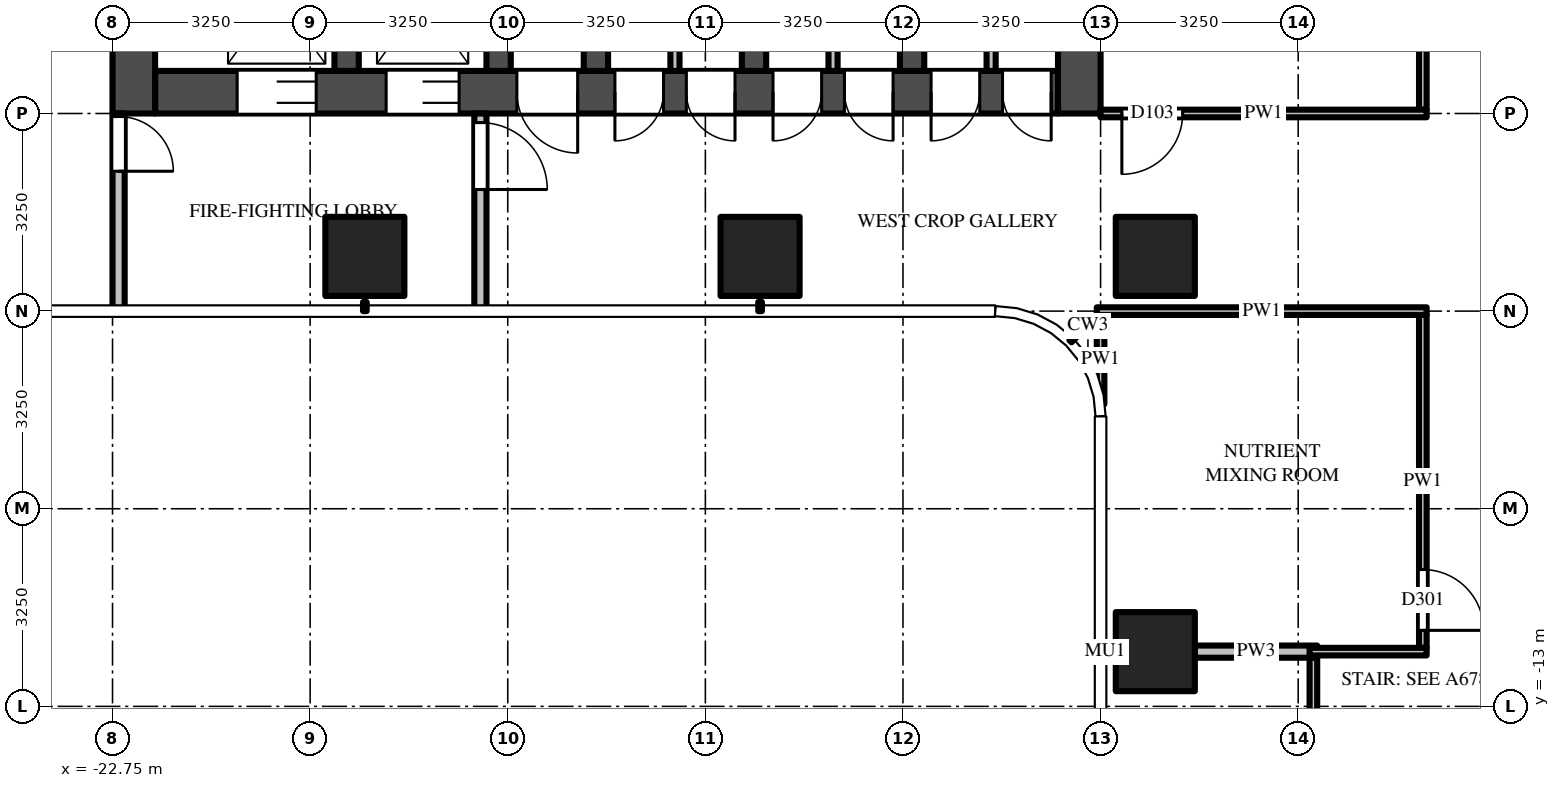
"""IFC4 building model, lengths in metres.
Left out: names, types, materials, properties, quantities, classifications, styles, units other than length and angle.
Written with IfcOpenShell. Run it as: python <this file> out.ifc"""

import sys

from ifc_helpers import new_model, si_unit, direction, frame, frame_2d, origin, origin_2d, place, context, subcontext, project, spatial, rectangle, extrude, source, transform, mapped, element, fill, save


model = new_model("IFC4")
c1 = context("Model", 3, precision=1e-05, world=origin(), true_north=direction((0.0, 1.0)))
c2 = subcontext(c1, "Body", "Model", "MODEL_VIEW")
j1 = project(units=[si_unit("LENGTHUNIT", "METRE"), si_unit("PLANEANGLEUNIT", "RADIAN")], contexts=[c1])
p1 = place(None, origin())
s1 = spatial("IfcSite", under=j1, at=p1, CompositionType="ELEMENT")
p2 = place(p1, origin())
s2 = spatial("IfcBuilding", under=s1, at=p2, CompositionType="ELEMENT")
p3 = place(p2, frame((0.0, 0.0, 120.0)))
s3 = spatial("IfcBuildingStorey", under=s2, at=p3, CompositionType="ELEMENT", Elevation=120.0)
m1 = source(origin(), c2, "Body", "SweptSolid", [
    extrude(rectangle(XDim=1.3, YDim=1.3, at=origin_2d()), origin(), (0.0, 0.0, 1.0), 4.5),
])
for number, where, z_axis, x_axis in (
    (1, (-5.6, -5.6, 0.0), (0.0, 0.0, 1.0), (1.0, 0.0, 0.0)),
    (2, (-5.6, -12.1, 0.0), (0.0, 0.0, 1.0), (1.0, 0.0, 0.0)),
    (3, (-12.1, -5.6, 0.0), (0.0, 0.0, 1.0), (1.0, 0.0, 0.0)),
    (4, (-18.6, -5.6, 0.0), (0.0, 0.0, 1.0), (1.0, 0.0, 0.0)),
):
    element("IfcColumn", number, at=place(p3, frame(where, z_axis=z_axis, x_axis=x_axis)), inside=s3, PredefinedType="COLUMN", context=c2, shape_type="MappedRepresentation", body=[
        mapped(m1, transform((0.0, 0.0, 0.0))),
    ])
m2 = source(origin(), c2, "Body", "SweptSolid", [
    extrude(rectangle(XDim=14.85, YDim=0.7, at=frame_2d((7.425, 0.0))), origin(), (0.0, 0.0, 1.0), 4.25),
])
p4 = place(p3, frame((-7.2, -2.9, 0.0), z_axis=(0.0, 0.0, 1.0), x_axis=(-1.0, 0.0, 0.0)))
e5 = element("IfcWall", 5, at=p4, inside=s3, PredefinedType="SHEAR", context=c2, shape_type="MappedRepresentation", body=[
    mapped(m2, transform((0.0, 0.0, 0.0))),
])
m3 = source(origin(), c2, "Body", "SweptSolid", [
    extrude(rectangle(XDim=1.3, YDim=2.1, at=frame_2d((0.65, 1.05))), frame((0.0, 0.36, 0.0), z_axis=(0.0, -1.0, 0.0), x_axis=(1.0, 0.0, 0.0)), (0.0, 0.0, 1.0), 0.72),
])
p5 = place(p4, frame((12.2, 0.0, 0.0)))
e6 = element("IfcOpeningElement", 6, at=p5, cuts=e5, PredefinedType="OPENING", context=c2, shape_type="MappedRepresentation", body=[
    mapped(m3, transform((0.0, 0.0, 0.0))),
])
m4 = source(origin(), c2, "Body", "SweptSolid", [
    extrude(rectangle(XDim=1.2, YDim=2.1, at=frame_2d((0.6, 1.05))), frame((0.0, 0.36, 0.0), z_axis=(0.0, -1.0, 0.0), x_axis=(1.0, 0.0, 0.0)), (0.0, 0.0, 1.0), 0.72),
])
p6 = place(p4, frame((9.85, 0.0, 0.0)))
e7 = element("IfcOpeningElement", 7, at=p6, cuts=e5, PredefinedType="OPENING", context=c2, shape_type="MappedRepresentation", body=[
    mapped(m4, transform((0.0, 0.0, 0.0))),
])
m5 = source(origin(), c2, "Body", "SweptSolid", [
    extrude(rectangle(XDim=1.0, YDim=2.1, at=frame_2d((0.5, 1.05))), frame((0.0, 0.36, 0.0), z_axis=(0.0, -1.0, 0.0), x_axis=(1.0, 0.0, 0.0)), (0.0, 0.0, 1.0), 0.72),
])
p7 = place(p4, frame((7.9, 0.0, 0.0)))
e8 = element("IfcOpeningElement", 8, at=p7, cuts=e5, PredefinedType="OPENING", context=c2, shape_type="MappedRepresentation", body=[
    mapped(m5, transform((0.0, 0.0, 0.0))),
])
m6 = source(origin(), c2, "Body", "SweptSolid", [
    extrude(rectangle(XDim=0.8, YDim=2.1, at=frame_2d((0.4, 1.05))), frame((0.0, 0.36, 0.0), z_axis=(0.0, -1.0, 0.0), x_axis=(1.0, 0.0, 0.0)), (0.0, 0.0, 1.0), 0.72),
])
p8 = place(p4, frame((0.113, 0.0, 0.0)))
e9 = element("IfcOpeningElement", 9, at=p8, cuts=e5, PredefinedType="OPENING", context=c2, shape_type="MappedRepresentation", body=[
    mapped(m6, transform((0.0, 0.0, 0.0))),
])
p9 = place(p4, frame((1.288, 0.0, 0.0)))
e10 = element("IfcOpeningElement", 10, at=p9, cuts=e5, PredefinedType="OPENING", context=c2, shape_type="MappedRepresentation", body=[
    mapped(m6, transform((0.0, 0.0, 0.0))),
])
p10 = place(p4, frame((2.712, 0.0, 0.0)))
e11 = element("IfcOpeningElement", 11, at=p10, cuts=e5, PredefinedType="OPENING", context=c2, shape_type="MappedRepresentation", body=[
    mapped(m6, transform((0.0, 0.0, 0.0))),
])
p11 = place(p4, frame((3.887, 0.0, 0.0)))
e12 = element("IfcOpeningElement", 12, at=p11, cuts=e5, PredefinedType="OPENING", context=c2, shape_type="MappedRepresentation", body=[
    mapped(m6, transform((0.0, 0.0, 0.0))),
])
p12 = place(p4, frame((5.312, 0.0, 0.0)))
e13 = element("IfcOpeningElement", 13, at=p12, cuts=e5, PredefinedType="OPENING", context=c2, shape_type="MappedRepresentation", body=[
    mapped(m6, transform((0.0, 0.0, 0.0))),
])
p13 = place(p4, frame((6.488, 0.0, 0.0)))
e14 = element("IfcOpeningElement", 14, at=p13, cuts=e5, PredefinedType="OPENING", context=c2, shape_type="MappedRepresentation", body=[
    mapped(m6, transform((0.0, 0.0, 0.0))),
])
m7 = source(origin(), c2, "Body", "SweptSolid", [
    extrude(rectangle(XDim=9.05, YDim=0.7, at=frame_2d((4.525, 0.0))), origin(), (0.0, 0.0, 1.0), 4.25),
])
p14 = place(p3, frame((-6.85, 5.8, 0.0), z_axis=(0.0, 0.0, 1.0), x_axis=(0.0, -1.0, 0.0)))
e15 = element("IfcWall", 15, at=p14, inside=s3, PredefinedType="SHEAR", context=c2, shape_type="MappedRepresentation", body=[
    mapped(m7, transform((0.0, 0.0, 0.0))),
])
m8 = source(origin(), c2, "Body", "SweptSolid", [
    extrude(rectangle(XDim=1.8, YDim=2.1, at=frame_2d((0.9, 1.05))), frame((0.0, 0.36, 0.0), z_axis=(0.0, -1.0, 0.0), x_axis=(1.0, 0.0, 0.0)), (0.0, 0.0, 1.0), 0.72),
])
p15 = place(p14, frame((3.15, 0.0, 0.0)))
e16 = element("IfcOpeningElement", 16, at=p15, cuts=e15, PredefinedType="OPENING", context=c2, shape_type="MappedRepresentation", body=[
    mapped(m8, transform((0.0, 0.0, 0.0))),
])
p16 = place(p3, frame((-22.4, 5.8, 0.0), z_axis=(0.0, 0.0, 1.0), x_axis=(0.0, -1.0, 0.0)))
e17 = element("IfcWall", 17, at=p16, inside=s3, PredefinedType="SHEAR", context=c2, shape_type="MappedRepresentation", body=[
    mapped(m7, transform((0.0, 0.0, 0.0))),
])
m9 = source(origin(), c2, "Body", "SweptSolid", [
    extrude(rectangle(XDim=2.45, YDim=0.4, at=frame_2d((1.225, 0.0))), origin(), (0.0, 0.0, 1.0), 4.25),
])
for number, where, z_axis, x_axis in (
    (18, (-9.6, -0.1, 0.0), (0.0, 0.0, 1.0), (0.0, -1.0, 0.0)),
    (19, (-12.2, -0.1, 0.0), (0.0, 0.0, 1.0), (0.0, -1.0, 0.0)),
    (20, (-14.8, -0.1, 0.0), (0.0, 0.0, 1.0), (0.0, -1.0, 0.0)),
    (21, (-16.4, -0.1, 0.0), (0.0, 0.0, 1.0), (0.0, -1.0, 0.0)),
    (22, (-18.9, -0.1, 0.0), (0.0, 0.0, 1.0), (0.0, -1.0, 0.0)),
):
    element("IfcWall", number, at=place(p3, frame(where, z_axis=z_axis, x_axis=x_axis)), inside=s3, PredefinedType="SHEAR", context=c2, shape_type="MappedRepresentation", body=[
        mapped(m9, transform((0.0, 0.0, 0.0))),
    ])
m10 = source(origin(), c2, "Body", "SweptSolid", [
    extrude(rectangle(XDim=3.25, YDim=0.2, at=frame_2d((1.625, 0.0))), origin(), (0.0, 0.0, 1.0), 4.25),
])
p17 = place(p3, frame((-16.7, -3.25, 0.0), z_axis=(0.0, 0.0, 1.0), x_axis=(0.0, -1.0, 0.0)))
e23 = element("IfcWall", 23, at=p17, inside=s3, PredefinedType="PARTITIONING", context=c2, shape_type="MappedRepresentation", body=[
    mapped(m10, transform((0.0, 0.0, 0.0))),
])
m11 = source(origin(), c2, "Body", "SweptSolid", [
    extrude(rectangle(XDim=1.1, YDim=2.1, at=frame_2d((0.55, 1.05))), frame((0.0, 0.11, 0.0), z_axis=(0.0, -1.0, 0.0), x_axis=(1.0, 0.0, 0.0)), (0.0, 0.0, 1.0), 0.22),
])
p18 = place(p17, frame((0.15, 0.0, 0.0)))
e24 = element("IfcOpeningElement", 24, at=p18, cuts=e23, PredefinedType="OPENING", context=c2, shape_type="MappedRepresentation", body=[
    mapped(m11, transform((0.0, 0.0, 0.0))),
])
p19 = place(p3, frame((-22.65, -3.25, 0.0), z_axis=(0.0, 0.0, 1.0), x_axis=(0.0, -1.0, 0.0)))
e25 = element("IfcWall", 25, at=p19, inside=s3, PredefinedType="PARTITIONING", context=c2, shape_type="MappedRepresentation", body=[
    mapped(m10, transform((0.0, 0.0, 0.0))),
])
m12 = source(origin(), c2, "Body", "SweptSolid", [
    extrude(rectangle(XDim=0.9, YDim=2.1, at=frame_2d((0.45, 1.05))), frame((0.0, 0.11, 0.0), z_axis=(0.0, -1.0, 0.0), x_axis=(1.0, 0.0, 0.0)), (0.0, 0.0, 1.0), 0.22),
])
p20 = place(p19, frame((0.05, 0.0, 0.0)))
e26 = element("IfcOpeningElement", 26, at=p20, cuts=e25, PredefinedType="OPENING", context=c2, shape_type="MappedRepresentation", body=[
    mapped(m12, transform((0.0, 0.0, 0.0))),
])
m13 = source(origin(), c2, "Body", "SweptSolid", [
    extrude(rectangle(XDim=2.45, YDim=0.15, at=frame_2d((1.225, 0.0))), origin(), (0.0, 0.0, 1.0), 4.25),
])
for number, where, z_axis, x_axis in (
    (27, (-8.3, -0.1, 0.0), (0.0, 0.0, 1.0), (0.0, -1.0, 0.0)),
    (28, (-10.9, -0.1, 0.0), (0.0, 0.0, 1.0), (0.0, -1.0, 0.0)),
    (29, (-13.5, -0.1, 0.0), (0.0, 0.0, 1.0), (0.0, -1.0, 0.0)),
):
    element("IfcWall", number, at=place(p3, frame(where, z_axis=z_axis, x_axis=x_axis)), inside=s3, PredefinedType="PARTITIONING", context=c2, shape_type="MappedRepresentation", body=[
        mapped(m13, transform((0.0, 0.0, 0.0))),
    ])
m14 = source(origin(), c2, "Body", "SweptSolid", [
    extrude(rectangle(XDim=1.469, YDim=0.125, at=frame_2d((0.734, 0.0))), origin(), (0.0, 0.0, 1.0), 4.25),
])
p21 = place(p3, frame((-6.5, -6.562, 0.0), z_axis=(0.0, 0.0, 1.0), x_axis=(0.0, -1.0, 0.0)))
e30 = element("IfcWall", 30, at=p21, inside=s3, PredefinedType="PARTITIONING", context=c2, shape_type="MappedRepresentation", body=[
    mapped(m14, transform((0.0, 0.0, 0.0))),
])
m15 = source(origin(), c2, "Body", "SweptSolid", [
    extrude(rectangle(XDim=8.738, YDim=0.125, at=frame_2d((4.369, 0.0))), origin(), (0.0, 0.0, 1.0), 3.468),
])
p22 = place(p3, frame((-3.0, -20.938, 0.0), z_axis=(0.0, 0.0, 1.0), x_axis=(0.0, 1.0, 0.0)))
e31 = element("IfcWall", 31, at=p22, inside=s3, PredefinedType="PARTITIONING", context=c2, shape_type="MappedRepresentation", body=[
    mapped(m15, transform((0.0, 0.0, 0.0))),
])
m16 = source(origin(), c2, "Body", "SweptSolid", [
    extrude(rectangle(XDim=5.475, YDim=0.125, at=frame_2d((2.738, 0.0))), origin(), (0.0, 0.0, 1.0), 3.468),
])
p23 = place(p3, frame((-1.2, -6.562, 0.0), z_axis=(0.0, 0.0, 1.0), x_axis=(0.0, -1.0, 0.0)))
e32 = element("IfcWall", 32, at=p23, inside=s3, PredefinedType="PARTITIONING", context=c2, shape_type="MappedRepresentation", body=[
    mapped(m16, transform((0.0, 0.0, 0.0))),
])
m17 = source(origin(), c2, "Body", "SweptSolid", [
    extrude(rectangle(XDim=1.0, YDim=2.1, at=frame_2d((0.5, 1.05))), frame((0.0, 0.073, 0.0), z_axis=(0.0, -1.0, 0.0), x_axis=(1.0, 0.0, 0.0)), (0.0, 0.0, 1.0), 0.145),
])
p24 = place(p23, frame((4.188, 0.0, 0.0)))
e33 = element("IfcOpeningElement", 33, at=p24, cuts=e32, PredefinedType="OPENING", context=c2, shape_type="MappedRepresentation", body=[
    mapped(m17, transform((0.0, 0.0, 0.0))),
])
m18 = source(origin(), c2, "Body", "SweptSolid", [
    extrude(rectangle(XDim=3.125, YDim=0.125, at=frame_2d((1.562, 0.0))), origin(), (0.0, 0.0, 1.0), 3.546),
])
p25 = place(p3, frame((-1.2, -0.062, 0.0), z_axis=(0.0, 0.0, 1.0), x_axis=(0.0, -1.0, 0.0)))
e34 = element("IfcWall", 34, at=p25, inside=s3, PredefinedType="PARTITIONING", context=c2, shape_type="MappedRepresentation", body=[
    mapped(m18, transform((0.0, 0.0, 0.0))),
])
m19 = source(origin(), c2, "Body", "SweptSolid", [
    extrude(rectangle(XDim=2.012, YDim=0.2, at=frame_2d((1.006, 0.0))), origin(), (0.0, 0.0, 1.0), 3.468),
])
p26 = place(p3, frame((-4.95, -12.1, 0.0), z_axis=(0.0, 0.0, 1.0), x_axis=(1.0, 0.0, 0.0)))
e35 = element("IfcWall", 35, at=p26, inside=s3, PredefinedType="PARTITIONING", context=c2, shape_type="MappedRepresentation", body=[
    mapped(m19, transform((0.0, 0.0, 0.0))),
])
m20 = source(origin(), c2, "Body", "SweptSolid", [
    extrude(rectangle(XDim=1.925, YDim=0.125, at=frame_2d((0.962, 0.0))), origin(), (0.0, 0.0, 1.0), 3.468),
])
p27 = place(p3, frame((-3.062, -12.1, 0.0), z_axis=(0.0, 0.0, 1.0), x_axis=(1.0, 0.0, 0.0)))
e36 = element("IfcWall", 36, at=p27, inside=s3, PredefinedType="PARTITIONING", context=c2, shape_type="MappedRepresentation", body=[
    mapped(m20, transform((0.0, 0.0, 0.0))),
])
m21 = source(origin(), c2, "Body", "SweptSolid", [
    extrude(rectangle(XDim=5.425, YDim=0.125, at=frame_2d((2.712, 0.0))), origin(), (0.0, 0.0, 1.0), 3.33),
])
p28 = place(p3, frame((-1.137, -6.5, 0.0), z_axis=(0.0, 0.0, 1.0), x_axis=(-1.0, 0.0, 0.0)))
e37 = element("IfcWall", 37, at=p28, inside=s3, PredefinedType="PARTITIONING", context=c2, shape_type="MappedRepresentation", body=[
    mapped(m21, transform((0.0, 0.0, 0.0))),
])
m22 = source(origin(), c2, "Body", "SweptSolid", [
    extrude(rectangle(XDim=5.363, YDim=0.125, at=frame_2d((2.681, 0.0))), origin(), (0.0, 0.0, 1.0), 3.468),
])
p29 = place(p3, frame((-1.137, -3.25, 0.0), z_axis=(0.0, 0.0, 1.0), x_axis=(-1.0, 0.0, 0.0)))
e38 = element("IfcWall", 38, at=p29, inside=s3, PredefinedType="PARTITIONING", context=c2, shape_type="MappedRepresentation", body=[
    mapped(m22, transform((0.0, 0.0, 0.0))),
])
p30 = place(p29, frame((4.012, 0.0, 0.0)))
e39 = element("IfcOpeningElement", 39, at=p30, cuts=e38, PredefinedType="OPENING", context=c2, shape_type="MappedRepresentation", body=[
    mapped(m17, transform((0.0, 0.0, 0.0))),
])
m23 = source(origin(), c2, "Body", "SweptSolid", [
    extrude(rectangle(XDim=1.3, YDim=2.1, at=frame_2d((0.65, 1.05))), frame((0.0, -0.275, 0.0), z_axis=(0.0, -1.0, 0.0), x_axis=(1.0, 0.0, 0.0)), (0.0, 0.0, 1.0), 0.05),
])
p31 = place(p5, origin())
e40 = element("IfcDoor", 40, at=p31, inside=s3, OperationType="DOUBLE_DOOR_SLIDING", PredefinedType="DOOR", context=c2, shape_type="MappedRepresentation", body=[
    mapped(m23, transform((0.0, 0.0, 0.0))),
])
fill(e6, e40)
m24 = source(origin(), c2, "Body", "SweptSolid", [
    extrude(rectangle(XDim=1.2, YDim=2.1, at=frame_2d((0.6, 1.05))), frame((0.0, -0.275, 0.0), z_axis=(0.0, -1.0, 0.0), x_axis=(1.0, 0.0, 0.0)), (0.0, 0.0, 1.0), 0.05),
])
p32 = place(p6, origin())
e41 = element("IfcDoor", 41, at=p32, inside=s3, OperationType="DOUBLE_DOOR_SLIDING", PredefinedType="DOOR", context=c2, shape_type="MappedRepresentation", body=[
    mapped(m24, transform((0.0, 0.0, 0.0))),
])
fill(e7, e41)
m25 = source(origin(), c2, "Body", "SweptSolid", [
    extrude(rectangle(XDim=1.0, YDim=2.1, at=frame_2d((0.5, 1.05))), frame((0.0, -0.275, 0.0), z_axis=(0.0, -1.0, 0.0), x_axis=(1.0, 0.0, 0.0)), (0.0, 0.0, 1.0), 0.05),
])
p33 = place(p7, origin())
e42 = element("IfcDoor", 42, at=p33, inside=s3, OperationType="SINGLE_SWING_LEFT", PredefinedType="DOOR", context=c2, shape_type="MappedRepresentation", body=[
    mapped(m25, transform((0.0, 0.0, 0.0))),
])
fill(e8, e42)
m26 = source(origin(), c2, "Body", "SweptSolid", [
    extrude(rectangle(XDim=1.1, YDim=2.1, at=frame_2d((0.55, 1.05))), frame((0.0, 0.025, 0.0), z_axis=(0.0, -1.0, 0.0), x_axis=(1.0, 0.0, 0.0)), (0.0, 0.0, 1.0), 0.05),
])
p34 = place(p18, origin())
e43 = element("IfcDoor", 43, at=p34, inside=s3, OperationType="SINGLE_SWING_RIGHT", PredefinedType="DOOR", context=c2, shape_type="MappedRepresentation", body=[
    mapped(m26, transform((0.0, 0.0, 0.0))),
])
fill(e24, e43)
m27 = source(origin(), c2, "Body", "SweptSolid", [
    extrude(rectangle(XDim=0.9, YDim=2.1, at=frame_2d((0.45, 1.05))), frame((0.0, 0.025, 0.0), z_axis=(0.0, -1.0, 0.0), x_axis=(1.0, 0.0, 0.0)), (0.0, 0.0, 1.0), 0.05),
])
p35 = place(p20, origin())
e44 = element("IfcDoor", 44, at=p35, inside=s3, OperationType="SINGLE_SWING_RIGHT", PredefinedType="DOOR", context=c2, shape_type="MappedRepresentation", body=[
    mapped(m27, transform((0.0, 0.0, 0.0))),
])
fill(e26, e44)
m28 = source(origin(), c2, "Body", "SweptSolid", [
    extrude(rectangle(XDim=0.8, YDim=2.1, at=frame_2d((0.4, 1.05))), frame((0.0, -0.275, 0.0), z_axis=(0.0, -1.0, 0.0), x_axis=(1.0, 0.0, 0.0)), (0.0, 0.0, 1.0), 0.05),
])
p36 = place(p8, origin())
e45 = element("IfcDoor", 45, at=p36, inside=s3, OperationType="SINGLE_SWING_LEFT", PredefinedType="DOOR", context=c2, shape_type="MappedRepresentation", body=[
    mapped(m28, transform((0.0, 0.0, 0.0))),
])
fill(e9, e45)
p37 = place(p9, origin())
e46 = element("IfcDoor", 46, at=p37, inside=s3, OperationType="SINGLE_SWING_RIGHT", PredefinedType="DOOR", context=c2, shape_type="MappedRepresentation", body=[
    mapped(m28, transform((0.0, 0.0, 0.0))),
])
fill(e10, e46)
p38 = place(p10, origin())
e47 = element("IfcDoor", 47, at=p38, inside=s3, OperationType="SINGLE_SWING_LEFT", PredefinedType="DOOR", context=c2, shape_type="MappedRepresentation", body=[
    mapped(m28, transform((0.0, 0.0, 0.0))),
])
fill(e11, e47)
p39 = place(p11, origin())
e48 = element("IfcDoor", 48, at=p39, inside=s3, OperationType="SINGLE_SWING_RIGHT", PredefinedType="DOOR", context=c2, shape_type="MappedRepresentation", body=[
    mapped(m28, transform((0.0, 0.0, 0.0))),
])
fill(e12, e48)
p40 = place(p12, origin())
e49 = element("IfcDoor", 49, at=p40, inside=s3, OperationType="SINGLE_SWING_LEFT", PredefinedType="DOOR", context=c2, shape_type="MappedRepresentation", body=[
    mapped(m28, transform((0.0, 0.0, 0.0))),
])
fill(e13, e49)
p41 = place(p13, origin())
e50 = element("IfcDoor", 50, at=p41, inside=s3, OperationType="SINGLE_SWING_RIGHT", PredefinedType="DOOR", context=c2, shape_type="MappedRepresentation", body=[
    mapped(m28, transform((0.0, 0.0, 0.0))),
])
fill(e14, e50)
m29 = source(origin(), c2, "Body", "SweptSolid", [
    extrude(rectangle(XDim=1.0, YDim=2.1, at=frame_2d((0.5, 1.05))), frame((0.0, 0.025, 0.0), z_axis=(0.0, -1.0, 0.0), x_axis=(1.0, 0.0, 0.0)), (0.0, 0.0, 1.0), 0.05),
])
p42 = place(p24, origin())
e51 = element("IfcDoor", 51, at=p42, inside=s3, OperationType="SINGLE_SWING_RIGHT", PredefinedType="DOOR", context=c2, shape_type="MappedRepresentation", body=[
    mapped(m29, transform((0.0, 0.0, 0.0))),
])
fill(e33, e51)
p43 = place(p30, origin())
e52 = element("IfcDoor", 52, at=p43, inside=s3, OperationType="SINGLE_SWING_RIGHT", PredefinedType="DOOR", context=c2, shape_type="MappedRepresentation", body=[
    mapped(m29, transform((0.0, 0.0, 0.0))),
])
fill(e39, e52)
save(model, sys.argv[1])
